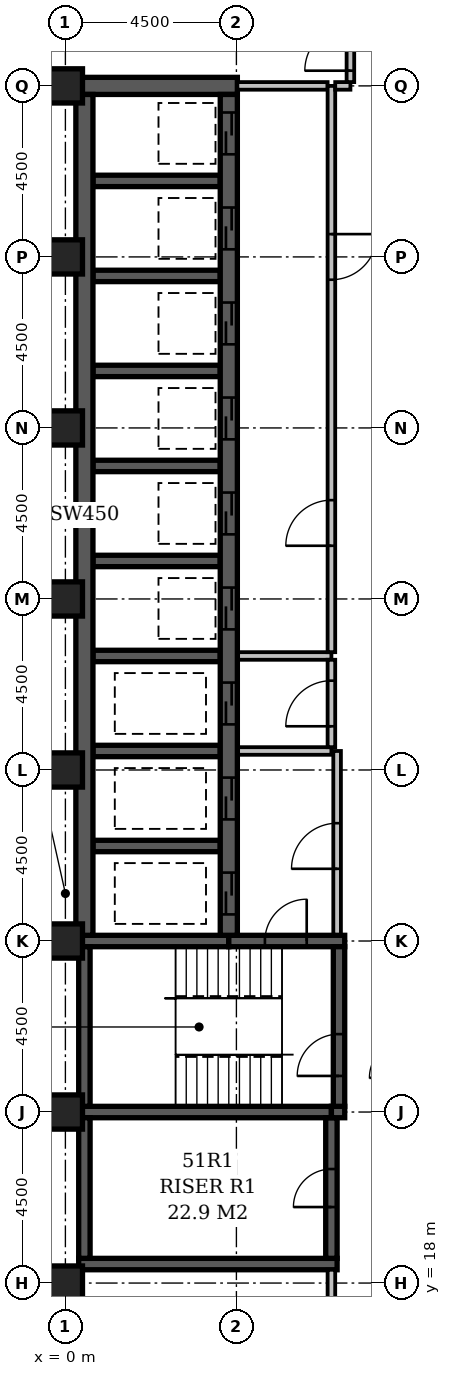
"""IFC4 building model, lengths in metres.
Left out: names, types, materials, properties, quantities, classifications, styles, units other than length and angle.
Written with IfcOpenShell. Run it as: python <this file> out.ifc"""

import sys

from ifc_helpers import new_model, si_unit, direction, frame, frame_2d, origin, origin_2d, place, context, subcontext, project, spatial, rectangle, extrude, element, fill, save


model = new_model("IFC4")
c1 = context("Model", 3, precision=1e-05, world=origin(), true_north=direction((0.0, 1.0)))
c2 = subcontext(c1, "Body", "Model", "MODEL_VIEW")
j1 = project(units=[si_unit("LENGTHUNIT", "METRE"), si_unit("PLANEANGLEUNIT", "RADIAN")], contexts=[c1])
p1 = place(None, origin())
s1 = spatial("IfcSite", under=j1, at=p1, CompositionType="ELEMENT")
p2 = place(p1, origin())
s2 = spatial("IfcBuilding", under=s1, at=p2, CompositionType="ELEMENT")
p3 = place(p2, frame((0.0, 0.0, 200.6)))
s3 = spatial("IfcBuildingStorey", under=s2, at=p3, CompositionType="ELEMENT", Elevation=200.6)
p4 = place(p3, frame((0.275, 49.5, -0.3), z_axis=(0.0, 0.0, 1.0), x_axis=(1.0, 0.0, 0.0)))
e1 = element("IfcWall", 1, at=p4, inside=s3, PredefinedType="SHEAR", context=c2, shape_type="SweptSolid", body=[
    extrude(rectangle(XDim=4.25, YDim=0.45, at=frame_2d((2.125, 0.0))), origin(), (0.0, 0.0, 1.0), 3.6),
])
p5 = place(p3, frame((0.35, 18.5, -0.3), z_axis=(0.0, 0.0, 1.0), x_axis=(1.0, 0.0, 0.0)))
e2 = element("IfcWall", 2, at=p5, inside=s3, PredefinedType="SHEAR", context=c2, shape_type="SweptSolid", body=[
    extrude(rectangle(XDim=6.8, YDim=0.3, at=frame_2d((3.4, 0.0))), origin(), (0.0, 0.0, 1.0), 3.6),
])
p6 = place(p3, frame((0.35, 22.5, -0.3), z_axis=(0.0, 0.0, 1.0), x_axis=(1.0, 0.0, 0.0)))
e3 = element("IfcWall", 3, at=p6, inside=s3, PredefinedType="SHEAR", context=c2, shape_type="SweptSolid", body=[
    extrude(rectangle(XDim=6.65, YDim=0.3, at=frame_2d((3.325, 0.0))), origin(), (0.0, 0.0, 1.0), 3.6),
])
p7 = place(p3, frame((0.35, 27.0, -0.3), z_axis=(0.0, 0.0, 1.0), x_axis=(1.0, 0.0, 0.0)))
e4 = element("IfcWall", 4, at=p7, inside=s3, PredefinedType="SHEAR", context=c2, shape_type="SweptSolid", body=[
    extrude(rectangle(XDim=3.95, YDim=0.3, at=frame_2d((1.975, 0.0))), origin(), (0.0, 0.0, 1.0), 3.6),
])
p8 = place(p3, frame((0.5, 18.65, -0.3), z_axis=(0.0, 0.0, 1.0), x_axis=(0.0, 1.0, 0.0)))
e5 = element("IfcWall", 5, at=p8, inside=s3, PredefinedType="SHEAR", context=c2, shape_type="SweptSolid", body=[
    extrude(rectangle(XDim=3.7, YDim=0.3, at=frame_2d((1.85, 0.0))), origin(), (0.0, 0.0, 1.0), 3.6),
])
p9 = place(p3, frame((0.5, 22.65, -0.3), z_axis=(0.0, 0.0, 1.0), x_axis=(0.0, 1.0, 0.0)))
e6 = element("IfcWall", 6, at=p9, inside=s3, PredefinedType="SHEAR", context=c2, shape_type="SweptSolid", body=[
    extrude(rectangle(XDim=4.2, YDim=0.3, at=frame_2d((2.1, 0.0))), origin(), (0.0, 0.0, 1.0), 3.6),
])
p10 = place(p3, frame((0.5, 27.15, -0.3), z_axis=(0.0, 0.0, 1.0), x_axis=(0.0, 1.0, 0.0)))
e7 = element("IfcWall", 7, at=p10, inside=s3, PredefinedType="SHEAR", context=c2, shape_type="SweptSolid", body=[
    extrude(rectangle(XDim=22.125, YDim=0.45, at=frame_2d((11.062, 0.0))), origin(), (0.0, 0.0, 1.0), 3.6),
])
for number, where, z_axis, x_axis in (
    (8, (0.725, 29.5, -0.3), (0.0, 0.0, 1.0), (1.0, 0.0, 0.0)),
    (9, (0.725, 32.0, -0.3), (0.0, 0.0, 1.0), (1.0, 0.0, 0.0)),
    (10, (0.725, 34.5, -0.3), (0.0, 0.0, 1.0), (1.0, 0.0, 0.0)),
    (11, (0.725, 37.0, -0.3), (0.0, 0.0, 1.0), (1.0, 0.0, 0.0)),
    (12, (0.725, 39.5, -0.3), (0.0, 0.0, 1.0), (1.0, 0.0, 0.0)),
    (13, (0.725, 42.0, -0.3), (0.0, 0.0, 1.0), (1.0, 0.0, 0.0)),
    (14, (0.725, 44.5, -0.3), (0.0, 0.0, 1.0), (1.0, 0.0, 0.0)),
    (15, (0.725, 47.0, -0.3), (0.0, 0.0, 1.0), (1.0, 0.0, 0.0)),
):
    element("IfcWall", number, at=place(p3, frame(where, z_axis=z_axis, x_axis=x_axis)), inside=s3, PredefinedType="SHEAR", context=c2, shape_type="SweptSolid", body=[
        extrude(rectangle(XDim=3.35, YDim=0.3, at=frame_2d((1.675, 0.0))), origin(), (0.0, 0.0, 1.0), 3.6),
    ])
p11 = place(p3, frame((4.3, 27.0, -0.3), z_axis=(0.0, 0.0, 1.0), x_axis=(1.0, 0.0, 0.0)))
e16 = element("IfcWall", 16, at=p11, inside=s3, PredefinedType="SHEAR", context=c2, shape_type="SweptSolid", body=[
    extrude(rectangle(XDim=3.05, YDim=0.3, at=frame_2d((1.525, 0.0))), origin(), (0.0, 0.0, 1.0), 3.6),
])
p12 = place(p11, frame((0.95, 0.0, 0.3)))
e17 = element("IfcOpeningElement", 17, at=p12, cuts=e16, PredefinedType="OPENING", context=c2, shape_type="SweptSolid", body=[
    extrude(rectangle(XDim=1.1, YDim=2.1, at=frame_2d((0.55, 1.05))), frame((0.0, 0.162, 0.0), z_axis=(0.0, -1.0, 0.0), x_axis=(1.0, 0.0, 0.0)), (0.0, 0.0, 1.0), 0.324),
])
p13 = place(p3, frame((4.3, 27.15, -0.3), z_axis=(0.0, 0.0, 1.0), x_axis=(0.0, 1.0, 0.0)))
e18 = element("IfcWall", 18, at=p13, inside=s3, PredefinedType="SHEAR", context=c2, shape_type="SweptSolid", body=[
    extrude(rectangle(XDim=22.125, YDim=0.45, at=frame_2d((11.062, 0.0))), origin(), (0.0, 0.0, 1.0), 3.6),
])
p14 = place(p13, frame((3.05, 0.0, 0.3)))
e19 = element("IfcOpeningElement", 19, at=p14, cuts=e18, PredefinedType="OPENING", context=c2, shape_type="SweptSolid", body=[
    extrude(rectangle(XDim=1.1, YDim=2.1, at=frame_2d((0.55, 1.05))), frame((0.0, 0.237, 0.0), z_axis=(0.0, -1.0, 0.0), x_axis=(1.0, 0.0, 0.0)), (0.0, 0.0, 1.0), 0.474),
])
p15 = place(p13, frame((0.55, 0.0, 0.3)))
e20 = element("IfcOpeningElement", 20, at=p15, cuts=e18, PredefinedType="OPENING", context=c2, shape_type="SweptSolid", body=[
    extrude(rectangle(XDim=1.1, YDim=2.1, at=frame_2d((0.55, 1.05))), frame((0.0, 0.237, 0.0), z_axis=(0.0, -1.0, 0.0), x_axis=(1.0, 0.0, 0.0)), (0.0, 0.0, 1.0), 0.474),
])
p16 = place(p13, frame((20.55, 0.0, 0.3)))
e21 = element("IfcOpeningElement", 21, at=p16, cuts=e18, PredefinedType="OPENING", context=c2, shape_type="SweptSolid", body=[
    extrude(rectangle(XDim=1.1, YDim=2.1, at=frame_2d((0.55, 1.05))), frame((0.0, 0.237, 0.0), z_axis=(0.0, -1.0, 0.0), x_axis=(1.0, 0.0, 0.0)), (0.0, 0.0, 1.0), 0.474),
])
p17 = place(p13, frame((18.05, 0.0, 0.3)))
e22 = element("IfcOpeningElement", 22, at=p17, cuts=e18, PredefinedType="OPENING", context=c2, shape_type="SweptSolid", body=[
    extrude(rectangle(XDim=1.1, YDim=2.1, at=frame_2d((0.55, 1.05))), frame((0.0, 0.237, 0.0), z_axis=(0.0, -1.0, 0.0), x_axis=(1.0, 0.0, 0.0)), (0.0, 0.0, 1.0), 0.474),
])
p18 = place(p13, frame((15.55, 0.0, 0.3)))
e23 = element("IfcOpeningElement", 23, at=p18, cuts=e18, PredefinedType="OPENING", context=c2, shape_type="SweptSolid", body=[
    extrude(rectangle(XDim=1.1, YDim=2.1, at=frame_2d((0.55, 1.05))), frame((0.0, 0.237, 0.0), z_axis=(0.0, -1.0, 0.0), x_axis=(1.0, 0.0, 0.0)), (0.0, 0.0, 1.0), 0.474),
])
p19 = place(p13, frame((13.05, 0.0, 0.3)))
e24 = element("IfcOpeningElement", 24, at=p19, cuts=e18, PredefinedType="OPENING", context=c2, shape_type="SweptSolid", body=[
    extrude(rectangle(XDim=1.1, YDim=2.1, at=frame_2d((0.55, 1.05))), frame((0.0, 0.237, 0.0), z_axis=(0.0, -1.0, 0.0), x_axis=(1.0, 0.0, 0.0)), (0.0, 0.0, 1.0), 0.474),
])
p20 = place(p13, frame((10.55, 0.0, 0.3)))
e25 = element("IfcOpeningElement", 25, at=p20, cuts=e18, PredefinedType="OPENING", context=c2, shape_type="SweptSolid", body=[
    extrude(rectangle(XDim=1.1, YDim=2.1, at=frame_2d((0.55, 1.05))), frame((0.0, 0.237, 0.0), z_axis=(0.0, -1.0, 0.0), x_axis=(1.0, 0.0, 0.0)), (0.0, 0.0, 1.0), 0.474),
])
p21 = place(p13, frame((8.05, 0.0, 0.3)))
e26 = element("IfcOpeningElement", 26, at=p21, cuts=e18, PredefinedType="OPENING", context=c2, shape_type="SweptSolid", body=[
    extrude(rectangle(XDim=1.1, YDim=2.1, at=frame_2d((0.55, 1.05))), frame((0.0, 0.237, 0.0), z_axis=(0.0, -1.0, 0.0), x_axis=(1.0, 0.0, 0.0)), (0.0, 0.0, 1.0), 0.474),
])
p22 = place(p13, frame((5.55, 0.0, 0.3)))
e27 = element("IfcOpeningElement", 27, at=p22, cuts=e18, PredefinedType="OPENING", context=c2, shape_type="SweptSolid", body=[
    extrude(rectangle(XDim=1.1, YDim=2.1, at=frame_2d((0.55, 1.05))), frame((0.0, 0.237, 0.0), z_axis=(0.0, -1.0, 0.0), x_axis=(1.0, 0.0, 0.0)), (0.0, 0.0, 1.0), 0.474),
])
p23 = place(p3, frame((7.0, 18.65, -0.3), z_axis=(0.0, 0.0, 1.0), x_axis=(0.0, 1.0, 0.0)))
e28 = element("IfcWall", 28, at=p23, inside=s3, PredefinedType="SHEAR", context=c2, shape_type="SweptSolid", body=[
    extrude(rectangle(XDim=3.7, YDim=0.3, at=frame_2d((1.85, 0.0))), origin(), (0.0, 0.0, 1.0), 3.6),
])
p24 = place(p23, frame((1.35, 0.0, 0.3)))
e29 = element("IfcOpeningElement", 29, at=p24, cuts=e28, PredefinedType="OPENING", context=c2, shape_type="SweptSolid", body=[
    extrude(rectangle(XDim=1.0, YDim=2.1, at=frame_2d((0.5, 1.05))), frame((0.0, 0.162, 0.0), z_axis=(0.0, -1.0, 0.0), x_axis=(1.0, 0.0, 0.0)), (0.0, 0.0, 1.0), 0.324),
])
p25 = place(p3, frame((7.0, 22.5, -0.3), z_axis=(0.0, 0.0, 1.0), x_axis=(1.0, 0.0, 0.0)))
e30 = element("IfcWall", 30, at=p25, inside=s3, PredefinedType="SHEAR", context=c2, shape_type="SweptSolid", body=[
    extrude(rectangle(XDim=0.35, YDim=0.3, at=frame_2d((0.175, 0.0))), origin(), (0.0, 0.0, 1.0), 3.6),
])
p26 = place(p3, frame((7.2, 22.65, -0.3), z_axis=(0.0, 0.0, 1.0), x_axis=(0.0, 1.0, 0.0)))
e31 = element("IfcWall", 31, at=p26, inside=s3, PredefinedType="SHEAR", context=c2, shape_type="SweptSolid", body=[
    extrude(rectangle(XDim=4.2, YDim=0.3, at=frame_2d((2.1, 0.0))), origin(), (0.0, 0.0, 1.0), 3.6),
])
p27 = place(p26, frame((0.8, 0.0, 0.3)))
e32 = element("IfcOpeningElement", 32, at=p27, cuts=e31, PredefinedType="OPENING", context=c2, shape_type="SweptSolid", body=[
    extrude(rectangle(XDim=1.1, YDim=2.1, at=frame_2d((0.55, 1.05))), frame((0.0, 0.162, 0.0), z_axis=(0.0, -1.0, 0.0), x_axis=(1.0, 0.0, 0.0)), (0.0, 0.0, 1.0), 0.324),
])
for number, where, z_axis, x_axis in (
    (33, (0.0, 18.0, -0.3), (0.0, 0.0, 1.0), (1.0, 0.0, 0.0)),
    (34, (0.0, 22.5, -0.3), (0.0, 0.0, 1.0), (1.0, 0.0, 0.0)),
    (35, (0.0, 27.0, -0.3), (0.0, 0.0, 1.0), (1.0, 0.0, 0.0)),
    (36, (0.0, 31.5, -0.3), (0.0, 0.0, 1.0), (1.0, 0.0, 0.0)),
    (37, (0.0, 36.0, -0.3), (0.0, 0.0, 1.0), (1.0, 0.0, 0.0)),
    (38, (0.0, 40.5, -0.3), (0.0, 0.0, 1.0), (1.0, 0.0, 0.0)),
    (39, (0.0, 45.0, -0.3), (0.0, 0.0, 1.0), (1.0, 0.0, 0.0)),
    (40, (0.0, 49.5, -0.3), (0.0, 0.0, 1.0), (1.0, 0.0, 0.0)),
):
    element("IfcColumn", number, at=place(p3, frame(where, z_axis=z_axis, x_axis=x_axis)), inside=s3, PredefinedType="COLUMN", context=c2, shape_type="SweptSolid", body=[
        extrude(rectangle(XDim=0.9, YDim=0.9, at=origin_2d()), origin(), (0.0, 0.0, 1.0), 3.6),
    ])
p28 = place(p3, frame((4.545, 34.5, 0.0), z_axis=(0.0, 0.0, 1.0), x_axis=(1.0, 0.0, 0.0)))
e41 = element("IfcWall", 41, at=p28, inside=s3, PredefinedType="PARTITIONING", context=c2, shape_type="SweptSolid", body=[
    extrude(rectangle(XDim=2.455, YDim=0.2, at=frame_2d((1.228, 0.0))), origin(), (0.0, 0.0, 1.0), 3.3),
])
p29 = place(p3, frame((7.0, 34.6, 0.0), z_axis=(0.0, 0.0, 1.0), x_axis=(0.0, 1.0, 0.0)))
e42 = element("IfcWall", 42, at=p29, inside=s3, PredefinedType="PARTITIONING", context=c2, shape_type="SweptSolid", body=[
    extrude(rectangle(XDim=14.9, YDim=0.2, at=frame_2d((7.45, 0.0))), origin(), (0.0, 0.0, 1.0), 3.3),
])
p30 = place(p29, frame((2.8, 0.0, 0.0)))
e43 = element("IfcOpeningElement", 43, at=p30, cuts=e42, PredefinedType="OPENING", context=c2, shape_type="SweptSolid", body=[
    extrude(rectangle(XDim=1.2, YDim=2.1, at=frame_2d((0.6, 1.05))), frame((0.0, 0.112, 0.0), z_axis=(0.0, -1.0, 0.0), x_axis=(1.0, 0.0, 0.0)), (0.0, 0.0, 1.0), 0.224),
])
p31 = place(p29, frame((9.8, 0.0, 0.0)))
e44 = element("IfcOpeningElement", 44, at=p31, cuts=e42, PredefinedType="OPENING", context=c2, shape_type="SweptSolid", body=[
    extrude(rectangle(XDim=1.2, YDim=2.1, at=frame_2d((0.6, 1.05))), frame((0.0, 0.112, 0.0), z_axis=(0.0, -1.0, 0.0), x_axis=(1.0, 0.0, 0.0)), (0.0, 0.0, 1.0), 0.224),
])
p32 = place(p3, frame((4.525, 49.5, 0.0), z_axis=(0.0, 0.0, 1.0), x_axis=(1.0, 0.0, 0.0)))
e45 = element("IfcWall", 45, at=p32, inside=s3, PredefinedType="PARTITIONING", context=c2, shape_type="SweptSolid", body=[
    extrude(rectangle(XDim=2.375, YDim=0.2, at=frame_2d((1.188, 0.0))), origin(), (0.0, 0.0, 1.0), 3.3),
])
p33 = place(p3, frame((4.545, 32.0, 0.0), z_axis=(0.0, 0.0, 1.0), x_axis=(1.0, 0.0, 0.0)))
e46 = element("IfcWall", 46, at=p33, inside=s3, PredefinedType="PARTITIONING", context=c2, shape_type="SweptSolid", body=[
    extrude(rectangle(XDim=2.455, YDim=0.2, at=frame_2d((1.228, 0.0))), origin(), (0.0, 0.0, 1.0), 3.3),
])
p34 = place(p3, frame((7.0, 32.1, 0.0), z_axis=(0.0, 0.0, 1.0), x_axis=(0.0, 1.0, 0.0)))
e47 = element("IfcWall", 47, at=p34, inside=s3, PredefinedType="PARTITIONING", context=c2, shape_type="SweptSolid", body=[
    extrude(rectangle(XDim=2.3, YDim=0.2, at=frame_2d((1.15, 0.0))), origin(), (0.0, 0.0, 1.0), 3.3),
])
p35 = place(p34, frame((0.55, 0.0, 0.0)))
e48 = element("IfcOpeningElement", 48, at=p35, cuts=e47, PredefinedType="OPENING", context=c2, shape_type="SweptSolid", body=[
    extrude(rectangle(XDim=1.2, YDim=2.1, at=frame_2d((0.6, 1.05))), frame((0.0, 0.112, 0.0), z_axis=(0.0, -1.0, 0.0), x_axis=(1.0, 0.0, 0.0)), (0.0, 0.0, 1.0), 0.224),
])
p36 = place(p3, frame((7.15, 27.17, 0.0), z_axis=(0.0, 0.0, 1.0), x_axis=(0.0, 1.0, 0.0)))
e49 = element("IfcWall", 49, at=p36, inside=s3, PredefinedType="PARTITIONING", context=c2, shape_type="SweptSolid", body=[
    extrude(rectangle(XDim=4.83, YDim=0.2, at=frame_2d((2.415, 0.0))), origin(), (0.0, 0.0, 1.0), 3.3),
])
p37 = place(p36, frame((1.73, 0.0, 0.0)))
e50 = element("IfcOpeningElement", 50, at=p37, cuts=e49, PredefinedType="OPENING", context=c2, shape_type="SweptSolid", body=[
    extrude(rectangle(XDim=1.2, YDim=2.1, at=frame_2d((0.6, 1.05))), frame((0.0, 0.112, 0.0), z_axis=(0.0, -1.0, 0.0), x_axis=(1.0, 0.0, 0.0)), (0.0, 0.0, 1.0), 0.224),
])
p38 = place(p3, frame((7.1, 49.5, 0.0), z_axis=(0.0, 0.0, 1.0), x_axis=(1.0, 0.0, 0.0)))
e51 = element("IfcWall", 51, at=p38, inside=s3, PredefinedType="PARTITIONING", context=c2, shape_type="SweptSolid", body=[
    extrude(rectangle(XDim=0.4, YDim=0.2, at=frame_2d((0.2, 0.0))), origin(), (0.0, 0.0, 1.0), 3.3),
])
p39 = place(p3, frame((7.5, 49.6, 0.0), z_axis=(0.0, 0.0, 1.0), x_axis=(0.0, 1.0, 0.0)))
e52 = element("IfcWall", 52, at=p39, inside=s3, PredefinedType="PARTITIONING", context=c2, shape_type="SweptSolid", body=[
    extrude(rectangle(XDim=3.9, YDim=0.2, at=frame_2d((1.95, 0.0))), origin(), (0.0, 0.0, 1.0), 3.3),
])
p40 = place(p39, frame((0.3, 0.0, 0.0)))
e53 = element("IfcOpeningElement", 53, at=p40, cuts=e52, PredefinedType="OPENING", context=c2, shape_type="SweptSolid", body=[
    extrude(rectangle(XDim=1.2, YDim=2.1, at=frame_2d((0.6, 1.05))), frame((0.0, 0.112, 0.0), z_axis=(0.0, -1.0, 0.0), x_axis=(1.0, 0.0, 0.0)), (0.0, 0.0, 1.0), 0.224),
])
p41 = place(p3, frame((7.0, 14.15, 0.0), z_axis=(0.0, 0.0, 1.0), x_axis=(0.0, 1.0, 0.0)))
e54 = element("IfcWall", 54, at=p41, inside=s3, PredefinedType="PARTITIONING", context=c2, shape_type="SweptSolid", body=[
    extrude(rectangle(XDim=4.2, YDim=0.2, at=frame_2d((2.1, 0.0))), origin(), (0.0, 0.0, 1.0), 3.3),
])
p42 = place(p41, frame((1.6, 0.0, 0.0)))
e55 = element("IfcOpeningElement", 55, at=p42, cuts=e54, PredefinedType="OPENING", context=c2, shape_type="SweptSolid", body=[
    extrude(rectangle(XDim=1.0, YDim=2.1, at=frame_2d((0.5, 1.05))), frame((0.0, 0.112, 0.0), z_axis=(0.0, -1.0, 0.0), x_axis=(1.0, 0.0, 0.0)), (0.0, 0.0, 1.0), 0.224),
])
p43 = place(p40, origin())
e56 = element("IfcDoor", 56, at=p43, inside=s3, OperationType="SINGLE_SWING_LEFT", PredefinedType="DOOR", context=c2, shape_type="SweptSolid", body=[
    extrude(rectangle(XDim=1.2, YDim=2.1, at=frame_2d((0.6, 1.05))), frame((0.0, 0.025, 0.0), z_axis=(0.0, -1.0, 0.0), x_axis=(1.0, 0.0, 0.0)), (0.0, 0.0, 1.0), 0.05),
])
fill(e53, e56)
p44 = place(p37, origin())
e57 = element("IfcDoor", 57, at=p44, inside=s3, OperationType="SINGLE_SWING_LEFT", PredefinedType="DOOR", context=c2, shape_type="SweptSolid", body=[
    extrude(rectangle(XDim=1.2, YDim=2.1, at=frame_2d((0.6, 1.05))), frame((0.0, 0.025, 0.0), z_axis=(0.0, -1.0, 0.0), x_axis=(1.0, 0.0, 0.0)), (0.0, 0.0, 1.0), 0.05),
])
fill(e50, e57)
p45 = place(p14, origin())
e58 = element("IfcDoor", 58, at=p45, inside=s3, OperationType="SLIDING_TO_LEFT", PredefinedType="DOOR", context=c2, shape_type="SweptSolid", body=[
    extrude(rectangle(XDim=1.1, YDim=2.1, at=frame_2d((0.55, 1.05))), frame((0.0, 0.025, 0.0), z_axis=(0.0, -1.0, 0.0), x_axis=(1.0, 0.0, 0.0)), (0.0, 0.0, 1.0), 0.05),
])
fill(e19, e58)
p46 = place(p15, origin())
e59 = element("IfcDoor", 59, at=p46, inside=s3, OperationType="SLIDING_TO_LEFT", PredefinedType="DOOR", context=c2, shape_type="SweptSolid", body=[
    extrude(rectangle(XDim=1.1, YDim=2.1, at=frame_2d((0.55, 1.05))), frame((0.0, 0.025, 0.0), z_axis=(0.0, -1.0, 0.0), x_axis=(1.0, 0.0, 0.0)), (0.0, 0.0, 1.0), 0.05),
])
fill(e20, e59)
p47 = place(p16, origin())
e60 = element("IfcDoor", 60, at=p47, inside=s3, OperationType="SLIDING_TO_LEFT", PredefinedType="DOOR", context=c2, shape_type="SweptSolid", body=[
    extrude(rectangle(XDim=1.1, YDim=2.1, at=frame_2d((0.55, 1.05))), frame((0.0, 0.025, 0.0), z_axis=(0.0, -1.0, 0.0), x_axis=(1.0, 0.0, 0.0)), (0.0, 0.0, 1.0), 0.05),
])
fill(e21, e60)
p48 = place(p17, origin())
e61 = element("IfcDoor", 61, at=p48, inside=s3, OperationType="SLIDING_TO_LEFT", PredefinedType="DOOR", context=c2, shape_type="SweptSolid", body=[
    extrude(rectangle(XDim=1.1, YDim=2.1, at=frame_2d((0.55, 1.05))), frame((0.0, 0.025, 0.0), z_axis=(0.0, -1.0, 0.0), x_axis=(1.0, 0.0, 0.0)), (0.0, 0.0, 1.0), 0.05),
])
fill(e22, e61)
p49 = place(p18, origin())
e62 = element("IfcDoor", 62, at=p49, inside=s3, OperationType="SLIDING_TO_LEFT", PredefinedType="DOOR", context=c2, shape_type="SweptSolid", body=[
    extrude(rectangle(XDim=1.1, YDim=2.1, at=frame_2d((0.55, 1.05))), frame((0.0, 0.025, 0.0), z_axis=(0.0, -1.0, 0.0), x_axis=(1.0, 0.0, 0.0)), (0.0, 0.0, 1.0), 0.05),
])
fill(e23, e62)
p50 = place(p19, origin())
e63 = element("IfcDoor", 63, at=p50, inside=s3, OperationType="SLIDING_TO_LEFT", PredefinedType="DOOR", context=c2, shape_type="SweptSolid", body=[
    extrude(rectangle(XDim=1.1, YDim=2.1, at=frame_2d((0.55, 1.05))), frame((0.0, 0.025, 0.0), z_axis=(0.0, -1.0, 0.0), x_axis=(1.0, 0.0, 0.0)), (0.0, 0.0, 1.0), 0.05),
])
fill(e24, e63)
p51 = place(p20, origin())
e64 = element("IfcDoor", 64, at=p51, inside=s3, OperationType="SLIDING_TO_LEFT", PredefinedType="DOOR", context=c2, shape_type="SweptSolid", body=[
    extrude(rectangle(XDim=1.1, YDim=2.1, at=frame_2d((0.55, 1.05))), frame((0.0, 0.025, 0.0), z_axis=(0.0, -1.0, 0.0), x_axis=(1.0, 0.0, 0.0)), (0.0, 0.0, 1.0), 0.05),
])
fill(e25, e64)
p52 = place(p21, origin())
e65 = element("IfcDoor", 65, at=p52, inside=s3, OperationType="SLIDING_TO_LEFT", PredefinedType="DOOR", context=c2, shape_type="SweptSolid", body=[
    extrude(rectangle(XDim=1.1, YDim=2.1, at=frame_2d((0.55, 1.05))), frame((0.0, 0.025, 0.0), z_axis=(0.0, -1.0, 0.0), x_axis=(1.0, 0.0, 0.0)), (0.0, 0.0, 1.0), 0.05),
])
fill(e26, e65)
p53 = place(p30, origin())
e66 = element("IfcDoor", 66, at=p53, inside=s3, OperationType="SINGLE_SWING_LEFT", PredefinedType="DOOR", context=c2, shape_type="SweptSolid", body=[
    extrude(rectangle(XDim=1.2, YDim=2.1, at=frame_2d((0.6, 1.05))), frame((0.0, 0.025, 0.0), z_axis=(0.0, -1.0, 0.0), x_axis=(1.0, 0.0, 0.0)), (0.0, 0.0, 1.0), 0.05),
])
fill(e43, e66)
p54 = place(p31, origin())
e67 = element("IfcDoor", 67, at=p54, inside=s3, OperationType="SINGLE_SWING_RIGHT", PredefinedType="DOOR", context=c2, shape_type="SweptSolid", body=[
    extrude(rectangle(XDim=1.2, YDim=2.1, at=frame_2d((0.6, 1.05))), frame((0.0, 0.025, 0.0), z_axis=(0.0, -1.0, 0.0), x_axis=(1.0, 0.0, 0.0)), (0.0, 0.0, 1.0), 0.05),
])
fill(e44, e67)
p55 = place(p35, origin())
e68 = element("IfcDoor", 68, at=p55, inside=s3, OperationType="SINGLE_SWING_LEFT", PredefinedType="DOOR", context=c2, shape_type="SweptSolid", body=[
    extrude(rectangle(XDim=1.2, YDim=2.1, at=frame_2d((0.6, 1.05))), frame((0.0, 0.025, 0.0), z_axis=(0.0, -1.0, 0.0), x_axis=(1.0, 0.0, 0.0)), (0.0, 0.0, 1.0), 0.05),
])
fill(e48, e68)
p56 = place(p22, origin())
e69 = element("IfcDoor", 69, at=p56, inside=s3, OperationType="SLIDING_TO_LEFT", PredefinedType="DOOR", context=c2, shape_type="SweptSolid", body=[
    extrude(rectangle(XDim=1.1, YDim=2.1, at=frame_2d((0.55, 1.05))), frame((0.0, 0.025, 0.0), z_axis=(0.0, -1.0, 0.0), x_axis=(1.0, 0.0, 0.0)), (0.0, 0.0, 1.0), 0.05),
])
fill(e27, e69)
p57 = place(p24, origin())
e70 = element("IfcDoor", 70, at=p57, inside=s3, OperationType="SINGLE_SWING_LEFT", PredefinedType="DOOR", context=c2, shape_type="SweptSolid", body=[
    extrude(rectangle(XDim=1.0, YDim=2.1, at=frame_2d((0.5, 1.05))), frame((0.0, 0.025, 0.0), z_axis=(0.0, -1.0, 0.0), x_axis=(1.0, 0.0, 0.0)), (0.0, 0.0, 1.0), 0.05),
])
fill(e29, e70)
p58 = place(p12, frame((1.1, 0.0, 0.0), z_axis=(0.0, 0.0, 1.0), x_axis=(-1.0, 0.0, 0.0)))
e71 = element("IfcDoor", 71, at=p58, inside=s3, OperationType="SINGLE_SWING_LEFT", PredefinedType="DOOR", context=c2, shape_type="SweptSolid", body=[
    extrude(rectangle(XDim=1.1, YDim=2.1, at=frame_2d((0.55, 1.05))), frame((0.0, 0.025, 0.0), z_axis=(0.0, -1.0, 0.0), x_axis=(1.0, 0.0, 0.0)), (0.0, 0.0, 1.0), 0.05),
])
fill(e17, e71)
p59 = place(p27, origin())
e72 = element("IfcDoor", 72, at=p59, inside=s3, OperationType="SINGLE_SWING_LEFT", PredefinedType="DOOR", context=c2, shape_type="SweptSolid", body=[
    extrude(rectangle(XDim=1.1, YDim=2.1, at=frame_2d((0.55, 1.05))), frame((0.0, 0.025, 0.0), z_axis=(0.0, -1.0, 0.0), x_axis=(1.0, 0.0, 0.0)), (0.0, 0.0, 1.0), 0.05),
])
fill(e32, e72)
save(model, sys.argv[1])
